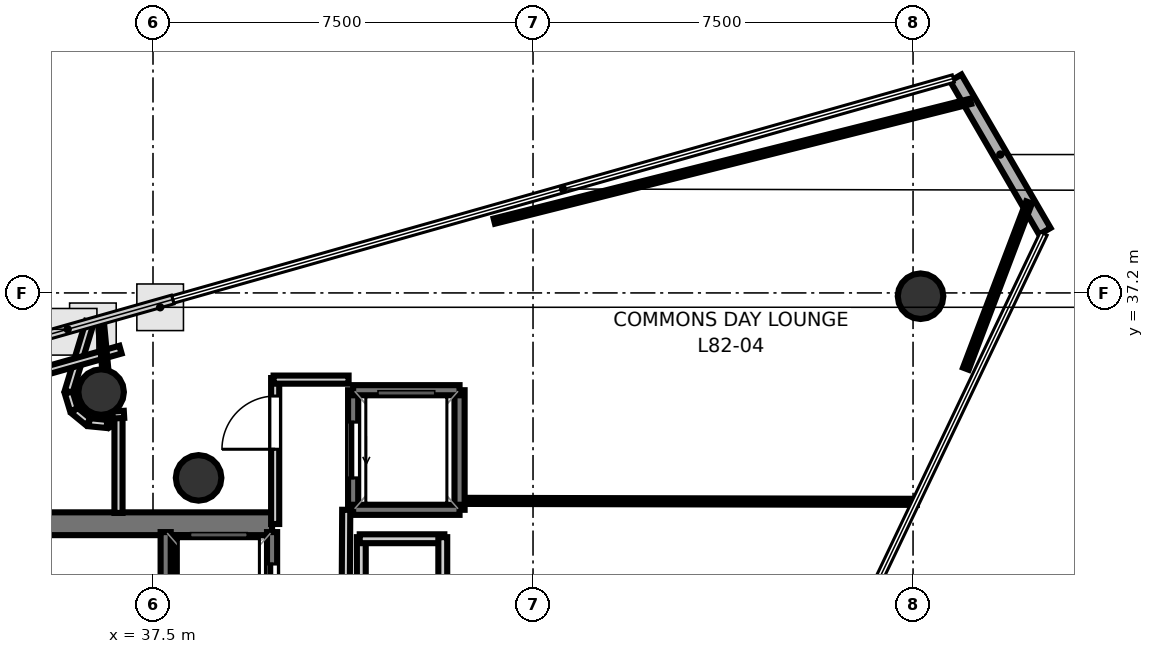
"""IFC4 building model, lengths in metres.
Left out: names, types, materials, properties, quantities, classifications, styles, units other than length and angle.
Written with IfcOpenShell. Run it as: python <this file> out.ifc"""

import sys

from ifc_helpers import new_model, si_unit, direction, frame, frame_2d, origin, origin_2d, place, context, subcontext, project, spatial, rectangle, hollow_circle, extrude, element, fill, save


model = new_model("IFC4")
c1 = context("Model", 3, precision=1e-05, world=origin(), true_north=direction((0.0, 1.0)))
c2 = subcontext(c1, "Body", "Model", "MODEL_VIEW")
j1 = project(units=[si_unit("LENGTHUNIT", "METRE"), si_unit("PLANEANGLEUNIT", "RADIAN")], contexts=[c1])
p1 = place(None, origin())
s1 = spatial("IfcSite", under=j1, at=p1, CompositionType="ELEMENT")
p2 = place(p1, origin())
s2 = spatial("IfcBuilding", under=s1, at=p2, CompositionType="ELEMENT")
p3 = place(p2, frame((0.0, 0.0, 317.6)))
s3 = spatial("IfcBuildingStorey", under=s2, at=p3, CompositionType="ELEMENT", Elevation=317.6)
p4 = place(p3, frame((29.33, 32.645, 0.0), z_axis=(0.0, 0.0, 1.0), x_axis=(1.0, 0.0, 0.0)))
e1 = element("IfcWall", 1, at=p4, inside=s3, PredefinedType="SHEAR", context=c2, shape_type="SweptSolid", body=[
    extrude(rectangle(XDim=10.52, YDim=0.45, at=frame_2d((5.26, 0.0))), origin(), (0.0, 0.0, 1.0), 3.4),
])
p5 = place(p4, frame((0.895, 0.0, 0.0)))
e2 = element("IfcOpeningElement", 2, at=p5, cuts=e1, PredefinedType="OPENING", context=c2, shape_type="SweptSolid", body=[
    extrude(rectangle(XDim=1.25, YDim=2.15, at=frame_2d((0.625, 1.075))), frame((0.0, 0.235, 0.0), z_axis=(0.0, -1.0, 0.0), x_axis=(1.0, 0.0, 0.0)), (0.0, 0.0, 1.0), 0.47),
])
p6 = place(p3, frame((38.18, 24.98, 0.0), z_axis=(0.0, 0.0, 1.0), x_axis=(0.0, 1.0, 0.0)))
e3 = element("IfcWall", 3, at=p6, inside=s3, PredefinedType="SHEAR", context=c2, shape_type="SweptSolid", body=[
    extrude(rectangle(XDim=7.44, YDim=0.45, at=frame_2d((3.72, 0.0))), origin(), (0.0, 0.0, 1.0), 3.4),
])
for number, where, z_axis, x_axis in (
    (4, (38.4, 33.55, 0.0), (0.0, 0.0, 1.0), (1.0, 0.0, 0.0)),
    (5, (52.648, 37.135, 0.0), (0.0, 0.0, 1.0), (1.0, 0.0, 0.0)),
    (6, (36.476, 35.243, 0.0), (0.0, 0.0, 1.0), (1.0, 0.0, 0.0)),
):
    element("IfcColumn", number, at=place(p3, frame(where, z_axis=z_axis, x_axis=x_axis)), inside=s3, PredefinedType="COLUMN", context=c2, shape_type="SweptSolid", body=[
        extrude(hollow_circle(Radius=0.45, WallThickness=0.025, at=origin_2d()), origin(), (0.0, 0.0, 1.0), 3.7),
    ])
p7 = place(p3, frame((55.101, 38.416, 0.0), z_axis=(0.0, 0.0, 1.0), x_axis=(-0.502036281823, 0.864846559647, 0.0)))
e7 = element("IfcWall", 7, at=p7, inside=s3, PredefinedType="SOLIDWALL", context=c2, shape_type="SweptSolid", body=[
    extrude(rectangle(XDim=3.502, YDim=0.26, at=frame_2d((1.751, 0.0))), origin(), (0.0, 0.0, 1.0), 3.4),
])
p8 = place(p3, frame((39.85, 30.12, 0.0), z_axis=(0.0, 0.0, 1.0), x_axis=(0.0, 1.0, 0.0)))
e8 = element("IfcWall", 8, at=p8, inside=s3, PredefinedType="SOLIDWALL", context=c2, shape_type="SweptSolid", body=[
    extrude(rectangle(XDim=2.36, YDim=0.2, at=frame_2d((1.18, 0.0))), origin(), (0.0, 0.0, 1.0), 3.4),
])
p9 = place(p8, frame((0.63, 0.0, 0.0)))
e9 = element("IfcOpeningElement", 9, at=p9, cuts=e8, PredefinedType="OPENING", context=c2, shape_type="SweptSolid", body=[
    extrude(rectangle(XDim=1.1, YDim=2.15, at=frame_2d((0.55, 1.075))), frame((0.0, 0.11, 0.0), z_axis=(0.0, -1.0, 0.0), x_axis=(1.0, 0.0, 0.0)), (0.0, 0.0, 1.0), 0.22),
])
p10 = place(p3, frame((37.75, 30.12, 0.0), z_axis=(0.0, 0.0, 1.0), x_axis=(0.0, 1.0, 0.0)))
e10 = element("IfcWall", 10, at=p10, inside=s3, PredefinedType="SOLIDWALL", context=c2, shape_type="SweptSolid", body=[
    extrude(rectangle(XDim=2.36, YDim=0.2, at=frame_2d((1.18, 0.0))), origin(), (0.0, 0.0, 1.0), 3.4),
])
p11 = place(p3, frame((43.55, 32.92, 0.0), z_axis=(0.0, 0.0, 1.0), x_axis=(0.0, 1.0, 0.0)))
e11 = element("IfcWall", 11, at=p11, inside=s3, PredefinedType="SOLIDWALL", context=c2, shape_type="SweptSolid", body=[
    extrude(rectangle(XDim=2.36, YDim=0.2, at=frame_2d((1.18, 0.0))), origin(), (0.0, 0.0, 1.0), 3.4),
])
p12 = place(p3, frame((41.45, 32.92, 0.0), z_axis=(0.0, 0.0, 1.0), x_axis=(0.0, 1.0, 0.0)))
e12 = element("IfcWall", 12, at=p12, inside=s3, PredefinedType="SOLIDWALL", context=c2, shape_type="SweptSolid", body=[
    extrude(rectangle(XDim=2.36, YDim=0.2, at=frame_2d((1.18, 0.0))), origin(), (0.0, 0.0, 1.0), 3.4),
])
p13 = place(p12, frame((0.63, 0.0, 0.0)))
e13 = element("IfcOpeningElement", 13, at=p13, cuts=e12, PredefinedType="OPENING", context=c2, shape_type="SweptSolid", body=[
    extrude(rectangle(XDim=1.1, YDim=2.15, at=frame_2d((0.55, 1.075))), frame((0.0, 0.11, 0.0), z_axis=(0.0, -1.0, 0.0), x_axis=(1.0, 0.0, 0.0)), (0.0, 0.0, 1.0), 0.22),
])
for number, where, z_axis, x_axis in (
    (14, (41.45, 35.28, 0.0), (0.0, 0.0, 1.0), (1.0, 0.0, 0.0)),
    (15, (41.45, 32.92, 0.0), (0.0, 0.0, 1.0), (1.0, 0.0, 0.0)),
):
    element("IfcWall", number, at=place(p3, frame(where, z_axis=z_axis, x_axis=x_axis)), inside=s3, PredefinedType="SOLIDWALL", context=c2, shape_type="SweptSolid", body=[
        extrude(rectangle(XDim=2.1, YDim=0.2, at=frame_2d((1.05, 0.0))), origin(), (0.0, 0.0, 1.0), 3.4),
    ])
p14 = place(p3, frame((36.252, 36.624, 0.0), z_axis=(0.0, 0.0, 1.0), x_axis=(-0.290314558178, -0.956931270944, 0.0)))
e16 = element("IfcWall", 16, at=p14, inside=s3, PredefinedType="PARTITIONING", context=c2, shape_type="SweptSolid", body=[
    extrude(rectangle(XDim=1.434, YDim=0.16, at=frame_2d((0.717, 0.0))), origin(), (0.0, 0.0, 1.0), 2.72),
])
p15 = place(p3, frame((35.836, 35.234, 0.0), z_axis=(0.0, 0.0, 1.0), x_axis=(0.29088731233, -0.956757321124, 0.0)))
e17 = element("IfcWall", 17, at=p15, inside=s3, PredefinedType="PARTITIONING", context=c2, shape_type="SweptSolid", body=[
    extrude(rectangle(XDim=0.354, YDim=0.16, at=frame_2d((0.177, 0.0))), origin(), (0.0, 0.0, 1.0), 2.72),
])
p16 = place(p3, frame((35.949, 34.88, 0.0), z_axis=(0.0, 0.0, 1.0), x_axis=(0.77300400279, -0.634401144128, 0.0)))
e18 = element("IfcWall", 18, at=p16, inside=s3, PredefinedType="PARTITIONING", context=c2, shape_type="SweptSolid", body=[
    extrude(rectangle(XDim=0.354, YDim=0.16, at=frame_2d((0.177, 0.0))), origin(), (0.0, 0.0, 1.0), 2.72),
])
p17 = place(p3, frame((36.24, 34.649, 0.0), z_axis=(0.0, 0.0, 1.0), x_axis=(0.995199611942, -0.097865889817, 0.0)))
e19 = element("IfcWall", 19, at=p17, inside=s3, PredefinedType="PARTITIONING", context=c2, shape_type="SweptSolid", body=[
    extrude(rectangle(XDim=0.354, YDim=0.16, at=frame_2d((0.177, 0.0))), origin(), (0.0, 0.0, 1.0), 2.72),
])
p18 = place(p3, frame((36.608, 34.617, 0.0), z_axis=(0.0, 0.0, 1.0), x_axis=(0.905429465341, 0.424496741203, 0.0)))
e20 = element("IfcWall", 20, at=p18, inside=s3, PredefinedType="PARTITIONING", context=c2, shape_type="SweptSolid", body=[
    extrude(rectangle(XDim=0.1, YDim=0.16, at=frame_2d((0.05, 0.0))), origin(), (0.0, 0.0, 1.0), 2.72),
])
p19 = place(p3, frame((36.819, 34.765, 0.0), z_axis=(0.0, 0.0, 1.0), x_axis=(0.0, -1.0, 0.0)))
e21 = element("IfcWall", 21, at=p19, inside=s3, PredefinedType="PARTITIONING", context=c2, shape_type="SweptSolid", body=[
    extrude(rectangle(XDim=1.907, YDim=0.16, at=frame_2d((0.953, 0.0))), origin(), (0.0, 0.0, 1.0), 2.72),
])
p20 = place(p3, frame((29.758, 34.071, 0.0), z_axis=(0.0, 0.0, 1.0), x_axis=(0.962177906446, 0.272421872006, 0.0)))
e22 = element("IfcWall", 22, at=p20, inside=s3, PredefinedType="PARTITIONING", context=c2, shape_type="SweptSolid", body=[
    extrude(rectangle(XDim=7.379, YDim=0.16, at=frame_2d((3.689, 0.0))), origin(), (0.0, 0.0, 1.0), 2.72),
])
p21 = place(p3, frame((39.911, 32.64, 0.0), z_axis=(0.0, 0.0, 1.0), x_axis=(0.0, 1.0, 0.0)))
e23 = element("IfcWall", 23, at=p21, inside=s3, PredefinedType="PARTITIONING", context=c2, shape_type="SweptSolid", body=[
    extrude(rectangle(XDim=2.88, YDim=0.16, at=frame_2d((1.44, 0.0))), origin(), (0.0, 0.0, 1.0), 2.72),
])
p22 = place(p21, frame((1.475, 0.0, 0.0)))
e24 = element("IfcOpeningElement", 24, at=p22, cuts=e23, PredefinedType="OPENING", context=c2, shape_type="SweptSolid", body=[
    extrude(rectangle(XDim=1.05, YDim=2.15, at=frame_2d((0.525, 1.075))), frame((0.0, 0.09, 0.0), z_axis=(0.0, -1.0, 0.0), x_axis=(1.0, 0.0, 0.0)), (0.0, 0.0, 1.0), 0.18),
])
p23 = place(p3, frame((39.88, 35.489, 0.0), z_axis=(0.0, 0.0, 1.0), x_axis=(1.0, 0.0, 0.0)))
e25 = element("IfcWall", 25, at=p23, inside=s3, PredefinedType="PARTITIONING", context=c2, shape_type="SweptSolid", body=[
    extrude(rectangle(XDim=1.48, YDim=0.16, at=frame_2d((0.74, 0.0))), origin(), (0.0, 0.0, 1.0), 2.72),
])
p24 = place(p3, frame((41.313, 32.92, 0.0), z_axis=(0.0, 0.0, 1.0), x_axis=(-0.005942518022, -0.999982343084, 0.0)))
e26 = element("IfcWall", 26, at=p24, inside=s3, PredefinedType="PARTITIONING", context=c2, shape_type="SweptSolid", body=[
    extrude(rectangle(XDim=8.34, YDim=0.16, at=frame_2d((4.17, 0.0))), origin(), (0.0, 0.0, 1.0), 2.72),
])
p25 = place(p3, frame((41.611, 29.41, 0.0), z_axis=(0.0, 0.0, 1.0), x_axis=(0.0, 1.0, 0.0)))
e27 = element("IfcWall", 27, at=p25, inside=s3, PredefinedType="PLUMBINGWALL", context=c2, shape_type="SweptSolid", body=[
    extrude(rectangle(XDim=2.97, YDim=0.175, at=frame_2d((1.485, 0.0))), origin(), (0.0, 0.0, 1.0), 2.72),
])
p26 = place(p3, frame((41.58, 32.349, 0.0), z_axis=(0.0, 0.0, 1.0), x_axis=(1.0, 0.0, 0.0)))
e28 = element("IfcWall", 28, at=p26, inside=s3, PredefinedType="PLUMBINGWALL", context=c2, shape_type="SweptSolid", body=[
    extrude(rectangle(XDim=1.67, YDim=0.175, at=frame_2d((0.835, 0.0))), origin(), (0.0, 0.0, 1.0), 2.72),
])
p27 = place(p3, frame((43.219, 32.38, 0.0), z_axis=(0.0, 0.0, 1.0), x_axis=(0.0, -1.0, 0.0)))
e29 = element("IfcWall", 29, at=p27, inside=s3, PredefinedType="PLUMBINGWALL", context=c2, shape_type="SweptSolid", body=[
    extrude(rectangle(XDim=2.97, YDim=0.175, at=frame_2d((1.485, 0.0))), origin(), (0.0, 0.0, 1.0), 2.72),
])
p28 = place(p27, frame((1.035, 0.0, 0.0)))
e30 = element("IfcOpeningElement", 30, at=p28, cuts=e29, PredefinedType="OPENING", context=c2, shape_type="SweptSolid", body=[
    extrude(rectangle(XDim=0.9, YDim=2.1, at=frame_2d((0.45, 1.05))), frame((0.0, 0.097, 0.0), z_axis=(0.0, -1.0, 0.0), x_axis=(1.0, 0.0, 0.0)), (0.0, 0.0, 1.0), 0.195),
])
p29 = place(p3, frame((43.72, 33.096, 0.0), z_axis=(0.0, 0.0, 1.0), x_axis=(0.999997687984, -0.0021503548, 0.0)))
e31 = element("IfcWall", 31, at=p29, inside=s3, PredefinedType="PARTITIONING", context=c2, shape_type="SweptSolid", body=[
    extrude(rectangle(XDim=8.856, YDim=0.12, at=frame_2d((4.428, 0.0))), origin(), (0.0, 0.0, 1.0), 2.72),
])
p30 = place(p3, frame((44.236, 38.617, 0.0), z_axis=(0.0, 0.0, 1.0), x_axis=(0.969806681955, 0.243874967219, 0.0)))
e32 = element("IfcWall", 32, at=p30, inside=s3, PredefinedType="PARTITIONING", context=c2, shape_type="SweptSolid", body=[
    extrude(rectangle(XDim=9.692, YDim=0.105, at=frame_2d((4.846, 0.0))), origin(), (0.0, 0.0, 1.0), 2.72),
])
p31 = place(p3, frame((54.79, 38.986, 0.0), z_axis=(0.0, 0.0, 1.0), x_axis=(-0.355312580214, -0.93474754364, 0.0)))
e33 = element("IfcWall", 33, at=p31, inside=s3, PredefinedType="PARTITIONING", context=c2, shape_type="SweptSolid", body=[
    extrude(rectangle(XDim=3.51, YDim=0.12, at=frame_2d((1.755, 0.0))), origin(), (0.0, 0.0, 1.0), 2.72),
])
p32 = place(p3, frame((36.928, 34.804, 0.0), z_axis=(0.0, 0.0, 1.0), x_axis=(-0.998281456217, -0.058601486101, 0.0)))
e34 = element("IfcWall", 34, at=p32, inside=s3, PredefinedType="PARTITIONING", context=c2, shape_type="SweptSolid", body=[
    extrude(rectangle(XDim=0.238, YDim=0.14, at=frame_2d((0.119, 0.0))), origin(), (0.0, 0.0, 1.0), 2.72),
])
p33 = place(p3, frame((36.645, 34.765, 0.0), z_axis=(0.0, 0.0, 1.0), x_axis=(-0.093054792145, 0.995660989323, 0.0)))
e35 = element("IfcWall", 35, at=p33, inside=s3, PredefinedType="PARTITIONING", context=c2, shape_type="SweptSolid", body=[
    extrude(rectangle(XDim=1.931, YDim=0.12, at=frame_2d((0.965, 0.0))), origin(), (0.0, 0.0, 1.0), 2.72),
])
p34 = place(p9, origin())
e36 = element("IfcDoor", 36, at=p34, inside=s3, OperationType="SLIDING_TO_LEFT", PredefinedType="DOOR", context=c2, shape_type="SweptSolid", body=[
    extrude(rectangle(XDim=1.1, YDim=2.15, at=frame_2d((0.55, 1.075))), frame((0.0, 0.025, 0.0), z_axis=(0.0, -1.0, 0.0), x_axis=(1.0, 0.0, 0.0)), (0.0, 0.0, 1.0), 0.05),
])
fill(e9, e36)
p35 = place(p13, origin())
e37 = element("IfcDoor", 37, at=p35, inside=s3, OperationType="SLIDING_TO_LEFT", PredefinedType="DOOR", context=c2, shape_type="SweptSolid", body=[
    extrude(rectangle(XDim=1.1, YDim=2.15, at=frame_2d((0.55, 1.075))), frame((0.0, 0.025, 0.0), z_axis=(0.0, -1.0, 0.0), x_axis=(1.0, 0.0, 0.0)), (0.0, 0.0, 1.0), 0.05),
])
fill(e13, e37)
p36 = place(p22, origin())
e38 = element("IfcDoor", 38, at=p36, inside=s3, OperationType="SINGLE_SWING_LEFT", PredefinedType="DOOR", context=c2, shape_type="SweptSolid", body=[
    extrude(rectangle(XDim=1.05, YDim=2.15, at=frame_2d((0.525, 1.075))), frame((0.0, 0.025, 0.0), z_axis=(0.0, -1.0, 0.0), x_axis=(1.0, 0.0, 0.0)), (0.0, 0.0, 1.0), 0.05),
])
fill(e24, e38)
save(model, sys.argv[1])
